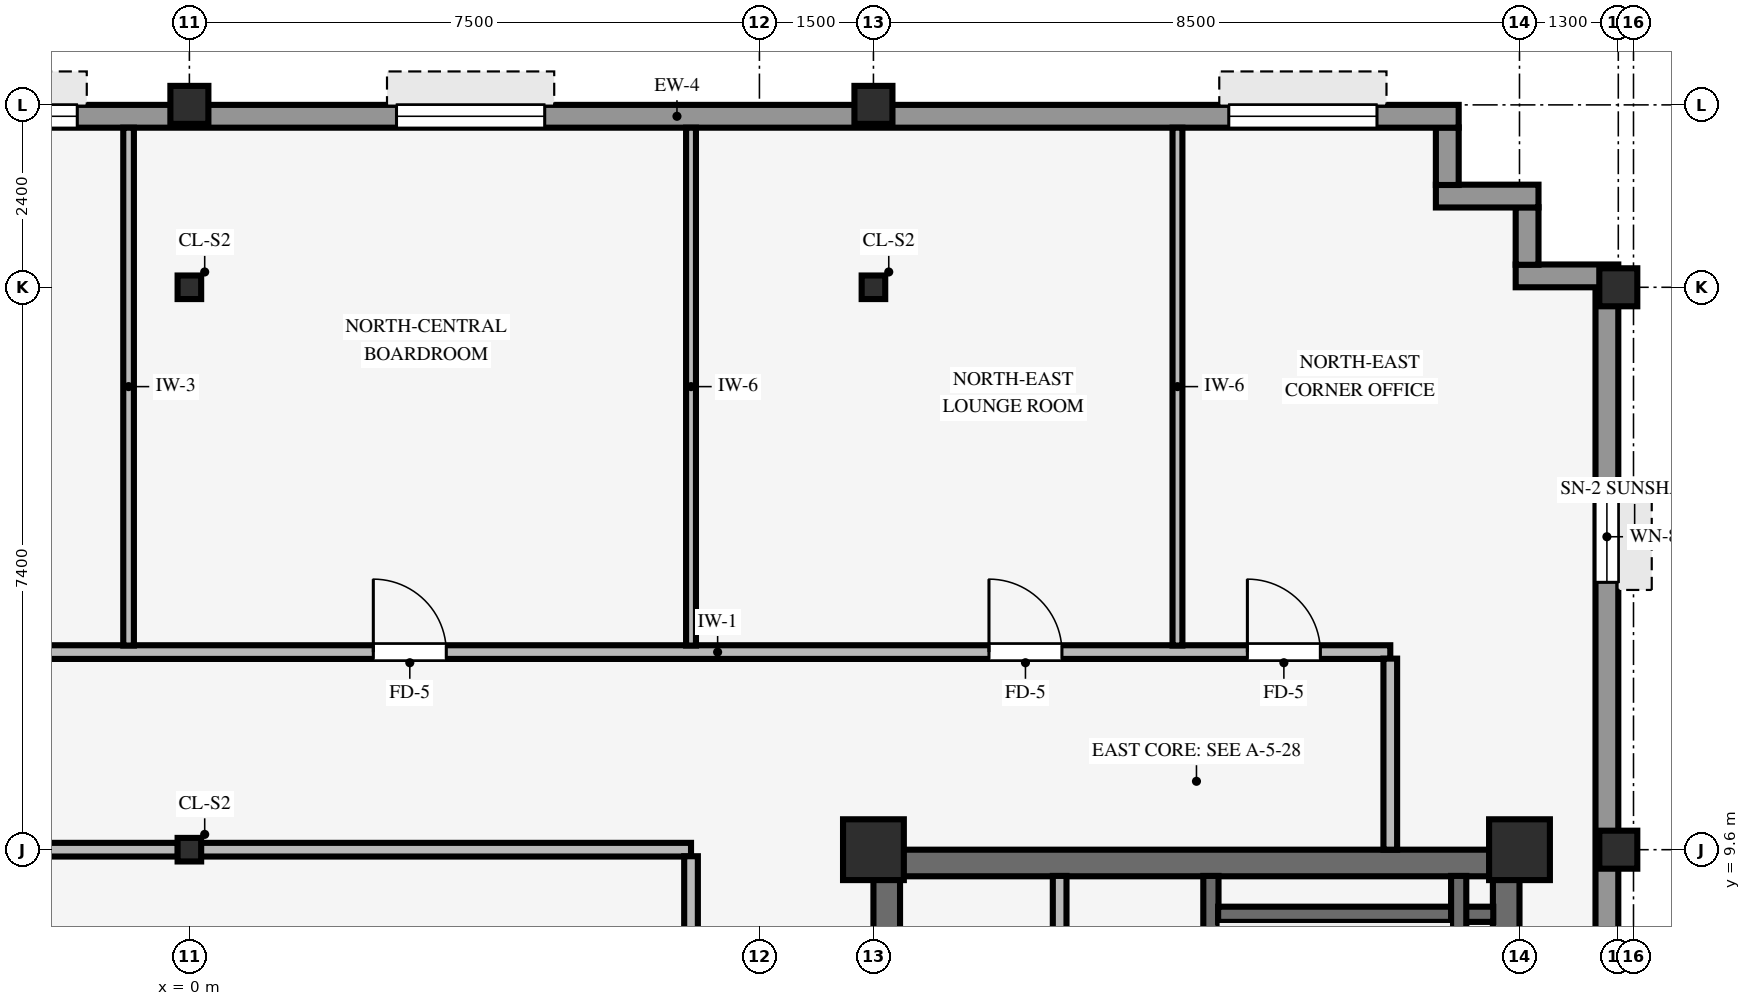
"""IFC4 building model, lengths in metres.
Left out: names, types, materials, properties, quantities, classifications, styles, units other than length and angle.
Written with IfcOpenShell. Run it as: python <this file> out.ifc"""

import sys

from ifc_helpers import new_model, si_unit, direction, frame, frame_2d, origin, origin_2d, place, context, subcontext, project, spatial, rectangle, hollow_rectangle, i_section, extrude, source, transform, mapped, element, fill, save


model = new_model("IFC4")
c1 = context("Model", 3, precision=1e-05, world=origin(), true_north=direction((0.0, 1.0)))
c2 = subcontext(c1, "Body", "Model", "MODEL_VIEW")
j1 = project(units=[si_unit("LENGTHUNIT", "METRE"), si_unit("PLANEANGLEUNIT", "RADIAN")], contexts=[c1])
p1 = place(None, origin())
s1 = spatial("IfcSite", under=j1, at=p1, CompositionType="ELEMENT")
p2 = place(p1, origin())
s2 = spatial("IfcBuilding", under=s1, at=p2, CompositionType="ELEMENT")
p3 = place(p2, frame((0.0, 0.0, 265.25)))
s3 = spatial("IfcBuildingStorey", under=s2, at=p3, CompositionType="ELEMENT", Elevation=265.25)
p4 = place(p3, frame((9.0, 9.425, 0.0), z_axis=(0.0, 0.0, 1.0), x_axis=(1.0, 0.0, 0.0)))
e1 = element("IfcWall", 1, at=p4, inside=s3, PredefinedType="SHEAR", context=c2, shape_type="SweptSolid", body=[
    extrude(rectangle(XDim=8.5, YDim=0.35, at=frame_2d((4.25, 0.0))), origin(), (0.0, 0.0, 1.0), 3.37),
])
p5 = place(p3, frame((9.175, -9.255, 0.0), z_axis=(0.0, 0.0, 1.0), x_axis=(0.0, 1.0, 0.0)))
e2 = element("IfcWall", 2, at=p5, inside=s3, PredefinedType="SHEAR", context=c2, shape_type="SweptSolid", body=[
    extrude(rectangle(XDim=18.51, YDim=0.35, at=frame_2d((9.255, 0.0))), origin(), (0.0, 0.0, 1.0), 3.37),
])
p6 = place(p5, frame((8.655, 0.0, 0.0)))
e3 = element("IfcOpeningElement", 3, at=p6, cuts=e2, PredefinedType="OPENING", context=c2, shape_type="SweptSolid", body=[
    extrude(rectangle(XDim=1.2, YDim=2.15, at=frame_2d((0.6, 1.075))), frame((0.0, 0.185, 0.0), z_axis=(0.0, -1.0, 0.0), x_axis=(1.0, 0.0, 0.0)), (0.0, 0.0, 1.0), 0.37),
])
p7 = place(p3, frame((17.325, -9.255, 0.0), z_axis=(0.0, 0.0, 1.0), x_axis=(0.0, 1.0, 0.0)))
e4 = element("IfcWall", 4, at=p7, inside=s3, PredefinedType="SHEAR", context=c2, shape_type="SweptSolid", body=[
    extrude(rectangle(XDim=18.51, YDim=0.35, at=frame_2d((9.255, 0.0))), origin(), (0.0, 0.0, 1.0), 3.37),
])
for number, where, z_axis, x_axis in (
    (5, (9.0, 9.6, 0.0), (0.0, 0.0, 1.0), (1.0, 0.0, 0.0)),
    (6, (17.5, 9.6, 0.0), (0.0, 0.0, 1.0), (1.0, 0.0, 0.0)),
):
    element("IfcColumn", number, at=place(p3, frame(where, z_axis=z_axis, x_axis=x_axis)), inside=s3, PredefinedType="COLUMN", context=c2, shape_type="SweptSolid", body=[
        extrude(rectangle(XDim=0.8, YDim=0.8, at=origin_2d()), origin(), (0.0, 0.0, 1.0), 3.37),
    ])
for number, where, z_axis, x_axis in (
    (7, (18.8, 9.6, 0.0), (0.0, 0.0, 1.0), (1.0, 0.0, 0.0)),
    (8, (18.8, 17.0, 0.0), (0.0, 0.0, 1.0), (1.0, 0.0, 0.0)),
    (9, (0.0, 19.4, 0.0), (0.0, 0.0, 1.0), (1.0, 0.0, 0.0)),
    (10, (9.0, 19.4, 0.0), (0.0, 0.0, 1.0), (1.0, 0.0, 0.0)),
):
    element("IfcColumn", number, at=place(p3, frame(where, z_axis=z_axis, x_axis=x_axis)), inside=s3, PredefinedType="COLUMN", context=c2, shape_type="SweptSolid", body=[
        extrude(hollow_rectangle(XDim=0.5, YDim=0.5, WallThickness=0.032, InnerFilletRadius=0.032, OuterFilletRadius=0.064, at=origin_2d()), origin(), (0.0, 0.0, 1.0), 3.37),
    ])
for number, where, z_axis, x_axis in (
    (11, (0.0, 9.6, 0.0), (0.0, 0.0, 1.0), (1.0, 0.0, 0.0)),
    (12, (0.0, 17.0, 0.0), (0.0, 0.0, 1.0), (1.0, 0.0, 0.0)),
    (13, (9.0, 17.0, 0.0), (0.0, 0.0, 1.0), (1.0, 0.0, 0.0)),
):
    element("IfcColumn", number, at=place(p3, frame(where, z_axis=z_axis, x_axis=x_axis)), inside=s3, PredefinedType="COLUMN", context=c2, shape_type="SweptSolid", body=[
        extrude(i_section(OverallWidth=0.31, OverallDepth=0.31, WebThickness=0.015, FlangeThickness=0.015, FilletRadius=0.015, at=origin_2d()), origin(), (0.0, 0.0, 1.0), 3.37),
    ])
p8 = place(p3, frame((18.65, -17.004, 0.0), z_axis=(0.0, 0.0, 1.0), x_axis=(0.0, 1.0, 0.0)))
e14 = element("IfcWall", 14, at=p8, inside=s3, PredefinedType="STANDARD", context=c2, shape_type="SweptSolid", body=[
    extrude(rectangle(XDim=34.008, YDim=0.3, at=frame_2d((17.004, 0.0))), origin(), (0.0, 0.0, 1.0), 2.705),
])
p9 = place(p8, frame((2.686, 0.0, 0.8)))
e15 = element("IfcOpeningElement", 15, at=p9, cuts=e14, PredefinedType="OPENING", context=c2, shape_type="SweptSolid", body=[
    extrude(rectangle(XDim=1.2, YDim=1.48, at=frame_2d((0.6, 0.74))), frame((0.0, 0.16, 0.0), z_axis=(0.0, -1.0, 0.0), x_axis=(1.0, 0.0, 0.0)), (0.0, 0.0, 1.0), 0.32),
])
p10 = place(p8, frame((30.122, 0.0, 0.8)))
e16 = element("IfcOpeningElement", 16, at=p10, cuts=e14, PredefinedType="OPENING", context=c2, shape_type="SweptSolid", body=[
    extrude(rectangle(XDim=1.2, YDim=1.48, at=frame_2d((0.6, 0.74))), frame((0.0, 0.16, 0.0), z_axis=(0.0, -1.0, 0.0), x_axis=(1.0, 0.0, 0.0)), (0.0, 0.0, 1.0), 0.32),
])
p11 = place(p3, frame((17.45, 17.15, 0.0), z_axis=(0.0, 0.0, 1.0), x_axis=(1.0, 0.0, 0.0)))
e17 = element("IfcWall", 17, at=p11, inside=s3, PredefinedType="STANDARD", context=c2, shape_type="SweptSolid", body=[
    extrude(rectangle(XDim=1.35, YDim=0.3, at=frame_2d((0.675, 0.0))), origin(), (0.0, 0.0, 1.0), 2.892),
])
p12 = place(p3, frame((17.6, 17.296, 0.0), z_axis=(0.0, 0.0, 1.0), x_axis=(0.0, 1.0, 0.0)))
e18 = element("IfcWall", 18, at=p12, inside=s3, PredefinedType="STANDARD", context=c2, shape_type="SweptSolid", body=[
    extrude(rectangle(XDim=0.758, YDim=0.3, at=frame_2d((0.379, 0.0))), origin(), (0.0, 0.0, 1.0), 2.892),
])
p13 = place(p3, frame((16.4, 18.2, 0.0), z_axis=(0.0, 0.0, 1.0), x_axis=(1.0, 0.0, 0.0)))
e19 = element("IfcWall", 19, at=p13, inside=s3, PredefinedType="STANDARD", context=c2, shape_type="SweptSolid", body=[
    extrude(rectangle(XDim=1.35, YDim=0.3, at=frame_2d((0.675, 0.0))), origin(), (0.0, 0.0, 1.0), 2.892),
])
p14 = place(p3, frame((16.55, 18.346, 0.0), z_axis=(0.0, 0.0, 1.0), x_axis=(0.0, 1.0, 0.0)))
e20 = element("IfcWall", 20, at=p14, inside=s3, PredefinedType="STANDARD", context=c2, shape_type="SweptSolid", body=[
    extrude(rectangle(XDim=0.758, YDim=0.3, at=frame_2d((0.379, 0.0))), origin(), (0.0, 0.0, 1.0), 2.892),
])
p15 = place(p3, frame((-18.9, 19.25, 0.0), z_axis=(0.0, 0.0, 1.0), x_axis=(1.0, 0.0, 0.0)))
e21 = element("IfcWall", 21, at=p15, inside=s3, PredefinedType="STANDARD", context=c2, shape_type="SweptSolid", body=[
    extrude(rectangle(XDim=35.6, YDim=0.3, at=frame_2d((17.8, 0.0))), origin(), (0.0, 0.0, 1.0), 2.705),
])
p16 = place(p15, frame((13.6, 0.0, 0.0)))
e22 = element("IfcOpeningElement", 22, at=p16, cuts=e21, PredefinedType="OPENING", context=c2, shape_type="SweptSolid", body=[
    extrude(rectangle(XDim=0.98, YDim=2.15, at=frame_2d((0.49, 1.075))), frame((0.0, 0.16, 0.0), z_axis=(0.0, -1.0, 0.0), x_axis=(1.0, 0.0, 0.0)), (0.0, 0.0, 1.0), 0.32),
])
p17 = place(p15, frame((2.425, 0.0, 0.8)))
e23 = element("IfcOpeningElement", 23, at=p17, cuts=e21, PredefinedType="OPENING", context=c2, shape_type="SweptSolid", body=[
    extrude(rectangle(XDim=1.95, YDim=1.48, at=frame_2d((0.975, 0.74))), frame((0.0, 0.16, 0.0), z_axis=(0.0, -1.0, 0.0), x_axis=(1.0, 0.0, 0.0)), (0.0, 0.0, 1.0), 0.32),
])
p18 = place(p15, frame((7.225, 0.0, 0.8)))
e24 = element("IfcOpeningElement", 24, at=p18, cuts=e21, PredefinedType="OPENING", context=c2, shape_type="SweptSolid", body=[
    extrude(rectangle(XDim=1.95, YDim=1.48, at=frame_2d((0.975, 0.74))), frame((0.0, 0.16, 0.0), z_axis=(0.0, -1.0, 0.0), x_axis=(1.0, 0.0, 0.0)), (0.0, 0.0, 1.0), 0.32),
])
p19 = place(p15, frame((15.475, 0.0, 0.8)))
e25 = element("IfcOpeningElement", 25, at=p19, cuts=e21, PredefinedType="OPENING", context=c2, shape_type="SweptSolid", body=[
    extrude(rectangle(XDim=1.95, YDim=1.48, at=frame_2d((0.975, 0.74))), frame((0.0, 0.16, 0.0), z_axis=(0.0, -1.0, 0.0), x_axis=(1.0, 0.0, 0.0)), (0.0, 0.0, 1.0), 0.32),
])
p20 = place(p15, frame((21.625, 0.0, 0.8)))
e26 = element("IfcOpeningElement", 26, at=p20, cuts=e21, PredefinedType="OPENING", context=c2, shape_type="SweptSolid", body=[
    extrude(rectangle(XDim=1.95, YDim=1.48, at=frame_2d((0.975, 0.74))), frame((0.0, 0.16, 0.0), z_axis=(0.0, -1.0, 0.0), x_axis=(1.0, 0.0, 0.0)), (0.0, 0.0, 1.0), 0.32),
])
p21 = place(p15, frame((32.575, 0.0, 0.8)))
e27 = element("IfcOpeningElement", 27, at=p21, cuts=e21, PredefinedType="OPENING", context=c2, shape_type="SweptSolid", body=[
    extrude(rectangle(XDim=1.95, YDim=1.48, at=frame_2d((0.975, 0.74))), frame((0.0, 0.16, 0.0), z_axis=(0.0, -1.0, 0.0), x_axis=(1.0, 0.0, 0.0)), (0.0, 0.0, 1.0), 0.32),
])
p22 = place(p3, frame((13.44, 0.9, 0.0), z_axis=(0.0, 0.0, 1.0), x_axis=(0.0, 1.0, 0.0)))
e28 = element("IfcWall", 28, at=p22, inside=s3, PredefinedType="SHEAR", context=c2, shape_type="SweptSolid", body=[
    extrude(rectangle(XDim=8.355, YDim=0.2, at=frame_2d((4.177, 0.0))), origin(), (0.0, 0.0, 1.0), 3.37),
])
p23 = place(p22, frame((0.43, 0.0, 0.0)))
e29 = element("IfcOpeningElement", 29, at=p23, cuts=e28, PredefinedType="OPENING", context=c2, shape_type="SweptSolid", body=[
    extrude(rectangle(XDim=1.1, YDim=2.15, at=frame_2d((0.55, 1.075))), frame((0.0, 0.11, 0.0), z_axis=(0.0, -1.0, 0.0), x_axis=(1.0, 0.0, 0.0)), (0.0, 0.0, 1.0), 0.22),
])
p24 = place(p3, frame((13.535, 8.75, 0.0), z_axis=(0.0, 0.0, 1.0), x_axis=(1.0, 0.0, 0.0)))
e30 = element("IfcWall", 30, at=p24, inside=s3, PredefinedType="SHEAR", context=c2, shape_type="SweptSolid", body=[
    extrude(rectangle(XDim=3.62, YDim=0.2, at=frame_2d((1.81, 0.0))), origin(), (0.0, 0.0, 1.0), 3.37),
])
p25 = place(p3, frame((16.7, 1.095, 0.0), z_axis=(0.0, 0.0, 1.0), x_axis=(0.0, 1.0, 0.0)))
e31 = element("IfcWall", 31, at=p25, inside=s3, PredefinedType="SHEAR", context=c2, shape_type="SweptSolid", body=[
    extrude(rectangle(XDim=8.16, YDim=0.2, at=frame_2d((4.08, 0.0))), origin(), (0.0, 0.0, 1.0), 3.37),
])
p26 = place(p3, frame((11.45, 4.19, 0.0), z_axis=(0.0, 0.0, 1.0), x_axis=(0.0, 1.0, 0.0)))
e32 = element("IfcWall", 32, at=p26, inside=s3, PredefinedType="PARTITIONING", context=c2, shape_type="SweptSolid", body=[
    extrude(rectangle(XDim=5.065, YDim=0.18, at=frame_2d((2.532, 0.0))), origin(), (0.0, 0.0, 1.0), 3.36),
])
for number, where, z_axis, x_axis in (
    (33, (-6.6, 9.6, 0.0), (0.0, 0.0, 1.0), (1.0, 0.0, 0.0)),
    (34, (0.151, 9.6, 0.0), (0.0, 0.0, 1.0), (1.0, 0.0, 0.0)),
):
    element("IfcWall", number, at=place(p3, frame(where, z_axis=z_axis, x_axis=x_axis)), inside=s3, PredefinedType="PARTITIONING", context=c2, shape_type="SweptSolid", body=[
        extrude(rectangle(XDim=6.449, YDim=0.18, at=frame_2d((3.225, 0.0))), origin(), (0.0, 0.0, 1.0), 2.405),
    ])
p27 = place(p3, frame((-9.0, 12.2, 0.0), z_axis=(0.0, 0.0, 1.0), x_axis=(1.0, 0.0, 0.0)))
e35 = element("IfcWall", 35, at=p27, inside=s3, PredefinedType="PARTITIONING", context=c2, shape_type="SweptSolid", body=[
    extrude(rectangle(XDim=24.8, YDim=0.18, at=frame_2d((12.4, 0.0))), origin(), (0.0, 0.0, 1.0), 3.36),
])
p28 = place(p27, frame((11.42, 0.0, 0.0)))
e36 = element("IfcOpeningElement", 36, at=p28, cuts=e35, PredefinedType="OPENING", context=c2, shape_type="SweptSolid", body=[
    extrude(rectangle(XDim=0.96, YDim=2.1, at=frame_2d((0.48, 1.05))), frame((0.0, 0.1, 0.0), z_axis=(0.0, -1.0, 0.0), x_axis=(1.0, 0.0, 0.0)), (0.0, 0.0, 1.0), 0.2),
])
p29 = place(p27, frame((4.82, 0.0, 0.0)))
e37 = element("IfcOpeningElement", 37, at=p29, cuts=e35, PredefinedType="OPENING", context=c2, shape_type="SweptSolid", body=[
    extrude(rectangle(XDim=0.96, YDim=2.1, at=frame_2d((0.48, 1.05))), frame((0.0, 0.1, 0.0), z_axis=(0.0, -1.0, 0.0), x_axis=(1.0, 0.0, 0.0)), (0.0, 0.0, 1.0), 0.2),
])
p30 = place(p27, frame((19.52, 0.0, 0.0)))
e38 = element("IfcOpeningElement", 38, at=p30, cuts=e35, PredefinedType="OPENING", context=c2, shape_type="SweptSolid", body=[
    extrude(rectangle(XDim=0.96, YDim=2.1, at=frame_2d((0.48, 1.05))), frame((0.0, 0.1, 0.0), z_axis=(0.0, -1.0, 0.0), x_axis=(1.0, 0.0, 0.0)), (0.0, 0.0, 1.0), 0.2),
])
p31 = place(p27, frame((22.92, 0.0, 0.0)))
e39 = element("IfcOpeningElement", 39, at=p31, cuts=e35, PredefinedType="OPENING", context=c2, shape_type="SweptSolid", body=[
    extrude(rectangle(XDim=0.96, YDim=2.1, at=frame_2d((0.48, 1.05))), frame((0.0, 0.1, 0.0), z_axis=(0.0, -1.0, 0.0), x_axis=(1.0, 0.0, 0.0)), (0.0, 0.0, 1.0), 0.2),
])
p32 = place(p27, frame((0.75, 0.0, 0.0)))
e40 = element("IfcOpeningElement", 40, at=p32, cuts=e35, PredefinedType="OPENING", context=c2, shape_type="SweptSolid", body=[
    extrude(rectangle(XDim=0.9, YDim=2.1, at=frame_2d((0.45, 1.05))), frame((0.0, 0.1, 0.0), z_axis=(0.0, -1.0, 0.0), x_axis=(1.0, 0.0, 0.0)), (0.0, 0.0, 1.0), 0.2),
])
p33 = place(p3, frame((-0.8, 12.286, 0.0), z_axis=(0.0, 0.0, 1.0), x_axis=(0.0, 1.0, 0.0)))
e41 = element("IfcWall", 41, at=p33, inside=s3, PredefinedType="PARTITIONING", context=c2, shape_type="SweptSolid", body=[
    extrude(rectangle(XDim=6.814, YDim=0.14, at=frame_2d((3.407, 0.0))), origin(), (0.0, 0.0, 1.0), 3.36),
])
p34 = place(p3, frame((6.6, 1.336, 0.0), z_axis=(0.0, 0.0, 1.0), x_axis=(0.0, 1.0, 0.0)))
e42 = element("IfcWall", 42, at=p34, inside=s3, PredefinedType="PARTITIONING", context=c2, shape_type="SweptSolid", body=[
    extrude(rectangle(XDim=8.178, YDim=0.18, at=frame_2d((4.089, 0.0))), origin(), (0.0, 0.0, 1.0), 3.36),
])
for number, where, z_axis, x_axis in (
    (43, (6.6, 12.286, 0.0), (0.0, 0.0, 1.0), (0.0, 1.0, 0.0)),
    (44, (13.0, 12.286, 0.0), (0.0, 0.0, 1.0), (0.0, 1.0, 0.0)),
):
    element("IfcWall", number, at=place(p3, frame(where, z_axis=z_axis, x_axis=x_axis)), inside=s3, PredefinedType="PARTITIONING", context=c2, shape_type="SweptSolid", body=[
        extrude(rectangle(XDim=6.814, YDim=0.13, at=frame_2d((3.407, 0.0))), origin(), (0.0, 0.0, 1.0), 3.36),
    ])
p35 = place(p3, frame((15.8, 9.6, 0.0), z_axis=(0.0, 0.0, 1.0), x_axis=(0.0, 1.0, 0.0)))
e45 = element("IfcWall", 45, at=p35, inside=s3, PredefinedType="PARTITIONING", context=c2, shape_type="SweptSolid", body=[
    extrude(rectangle(XDim=2.514, YDim=0.18, at=frame_2d((1.257, 0.0))), origin(), (0.0, 0.0, 1.0), 3.36),
])
m1 = source(origin(), c2, "Body", "SweptSolid", [
    extrude(rectangle(XDim=1.2, YDim=1.48, at=frame_2d((0.6, 0.74))), frame((0.0, 0.03, 0.0), z_axis=(0.0, -1.0, 0.0), x_axis=(1.0, 0.0, 0.0)), (0.0, 0.0, 1.0), 0.06),
])
p36 = place(p10, origin())
e46 = element("IfcWindow", 46, at=p36, inside=s3, PartitioningType="SINGLE_PANEL", PredefinedType="WINDOW", context=c2, shape_type="MappedRepresentation", body=[
    mapped(m1, transform((0.0, 0.0, 0.0), scale=1.0)),
])
fill(e16, e46)
m2 = source(origin(), c2, "Body", "SweptSolid", [
    extrude(rectangle(XDim=1.95, YDim=1.48, at=frame_2d((0.975, 0.74))), frame((0.0, 0.03, 0.0), z_axis=(0.0, -1.0, 0.0), x_axis=(1.0, 0.0, 0.0)), (0.0, 0.0, 1.0), 0.06),
])
p37 = place(p19, origin())
e47 = element("IfcWindow", 47, at=p37, inside=s3, PartitioningType="SINGLE_PANEL", PredefinedType="WINDOW", context=c2, shape_type="MappedRepresentation", body=[
    mapped(m2, transform((0.0, 0.0, 0.0), scale=1.0)),
])
fill(e25, e47)
p38 = place(p20, origin())
e48 = element("IfcWindow", 48, at=p38, inside=s3, PartitioningType="SINGLE_PANEL", PredefinedType="WINDOW", context=c2, shape_type="MappedRepresentation", body=[
    mapped(m2, transform((0.0, 0.0, 0.0), scale=1.0)),
])
fill(e26, e48)
p39 = place(p21, origin())
e49 = element("IfcWindow", 49, at=p39, inside=s3, PartitioningType="SINGLE_PANEL", PredefinedType="WINDOW", context=c2, shape_type="MappedRepresentation", body=[
    mapped(m2, transform((0.0, 0.0, 0.0), scale=1.0)),
])
fill(e27, e49)
m3 = source(origin(), c2, "Body", "SweptSolid", [
    extrude(rectangle(XDim=0.96, YDim=2.1, at=frame_2d((0.48, 1.05))), frame((0.0, 0.025, 0.0), z_axis=(0.0, -1.0, 0.0), x_axis=(1.0, 0.0, 0.0)), (0.0, 0.0, 1.0), 0.05),
])
p40 = place(p28, origin())
e50 = element("IfcDoor", 50, at=p40, inside=s3, OperationType="SINGLE_SWING_LEFT", PredefinedType="DOOR", context=c2, shape_type="MappedRepresentation", body=[
    mapped(m3, transform((0.0, 0.0, 0.0), scale=1.0)),
])
fill(e36, e50)
p41 = place(p30, origin())
e51 = element("IfcDoor", 51, at=p41, inside=s3, OperationType="SINGLE_SWING_LEFT", PredefinedType="DOOR", context=c2, shape_type="MappedRepresentation", body=[
    mapped(m3, transform((0.0, 0.0, 0.0), scale=1.0)),
])
fill(e38, e51)
p42 = place(p31, origin())
e52 = element("IfcDoor", 52, at=p42, inside=s3, OperationType="SINGLE_SWING_LEFT", PredefinedType="DOOR", context=c2, shape_type="MappedRepresentation", body=[
    mapped(m3, transform((0.0, 0.0, 0.0), scale=1.0)),
])
fill(e39, e52)
save(model, sys.argv[1])
